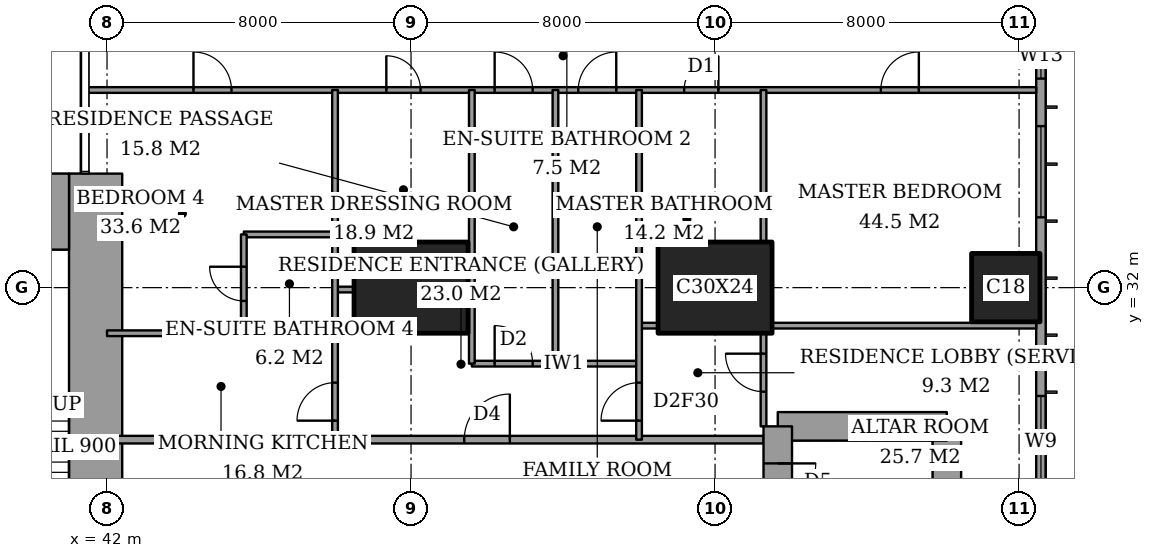
"""IFC4 building model, lengths in metres.
Left out: names, types, materials, properties, quantities, classifications, styles, units other than length and angle.
Written with IfcOpenShell. Run it as: python <this file> out.ifc"""

import sys

from ifc_helpers import new_model, si_unit, direction, frame, frame_2d, origin, origin_2d, place, context, subcontext, project, spatial, rectangle, extrude, element, fill, save


model = new_model("IFC4")
c1 = context("Model", 3, precision=1e-05, world=origin(), true_north=direction((0.0, 1.0)))
c2 = subcontext(c1, "Body", "Model", "MODEL_VIEW")
j1 = project(units=[si_unit("LENGTHUNIT", "METRE"), si_unit("PLANEANGLEUNIT", "RADIAN")], contexts=[c1])
p1 = place(None, origin())
s1 = spatial("IfcSite", under=j1, at=p1, CompositionType="ELEMENT")
p2 = place(p1, origin())
s2 = spatial("IfcBuilding", under=s1, at=p2, CompositionType="ELEMENT")
p3 = place(p2, frame((0.0, 0.0, 203.8)))
s3 = spatial("IfcBuildingStorey", under=s2, at=p3, CompositionType="ELEMENT", Elevation=203.8)
for number, where, z_axis, x_axis in (
    (1, (50.0, 32.0, 0.0), (0.0, 0.0, 1.0), (1.0, 0.0, 0.0)),
    (2, (58.0, 32.0, 0.0), (0.0, 0.0, 1.0), (1.0, 0.0, 0.0)),
):
    element("IfcColumn", number, at=place(p3, frame(where, z_axis=z_axis, x_axis=x_axis)), inside=s3, PredefinedType="COLUMN", context=c2, shape_type="SweptSolid", body=[
        extrude(rectangle(XDim=3.0, YDim=2.4, at=origin_2d()), origin(), (0.0, 0.0, 1.0), 3.6),
    ])
p4 = place(p3, frame((65.65, 32.0, 0.0), z_axis=(0.0, 0.0, 1.0), x_axis=(1.0, 0.0, 0.0)))
e3 = element("IfcColumn", 3, at=p4, inside=s3, PredefinedType="COLUMN", context=c2, shape_type="SweptSolid", body=[
    extrude(rectangle(XDim=1.8, YDim=1.8, at=origin_2d()), origin(), (0.0, 0.0, 1.0), 3.6),
])
p5 = place(p3, frame((37.85, 34.0, 0.0), z_axis=(0.0, 0.0, 1.0), x_axis=(1.0, 0.0, 0.0)))
e4 = element("IfcWall", 4, at=p5, inside=s3, PredefinedType="SHEAR", context=c2, shape_type="SweptSolid", body=[
    extrude(rectangle(XDim=3.15, YDim=2.0, at=frame_2d((1.575, 0.0))), origin(), (0.0, 0.0, 1.0), 3.6),
])
p6 = place(p3, frame((41.7, 24.85, 0.0), z_axis=(0.0, 0.0, 1.0), x_axis=(0.0, 1.0, 0.0)))
e5 = element("IfcWall", 5, at=p6, inside=s3, PredefinedType="SHEAR", context=c2, shape_type="SweptSolid", body=[
    extrude(rectangle(XDim=10.15, YDim=1.4, at=frame_2d((5.075, 0.0))), origin(), (0.0, 0.0, 1.0), 3.6),
])
p7 = place(p3, frame((64.1, 19.65, 0.0), z_axis=(0.0, 0.0, 1.0), x_axis=(0.0, 1.0, 0.0)))
e6 = element("IfcWall", 6, at=p7, inside=s3, PredefinedType="SHEAR", context=c2, shape_type="SweptSolid", body=[
    extrude(rectangle(XDim=8.7, YDim=0.75, at=frame_2d((4.35, 0.0))), origin(), (0.0, 0.0, 1.0), 3.6),
])
p8 = place(p3, frame((64.1, 28.35, 0.0), z_axis=(0.0, 0.0, 1.0), x_axis=(-1.0, 0.0, 0.0)))
e7 = element("IfcWall", 7, at=p8, inside=s3, PredefinedType="SHEAR", context=c2, shape_type="SweptSolid", body=[
    extrude(rectangle(XDim=4.45, YDim=0.75, at=frame_2d((2.225, 0.0))), origin(), (0.0, 0.0, 1.0), 3.6),
])
p9 = place(p3, frame((59.65, 28.35, 0.0), z_axis=(0.0, 0.0, 1.0), x_axis=(0.0, -1.0, 0.0)))
e8 = element("IfcWall", 8, at=p9, inside=s3, PredefinedType="SHEAR", context=c2, shape_type="SweptSolid", body=[
    extrude(rectangle(XDim=8.7, YDim=0.75, at=frame_2d((4.35, 0.0))), origin(), (0.0, 0.0, 1.0), 3.6),
])
p10 = place(p9, frame((0.975, 0.0, 0.0)))
e9 = element("IfcOpeningElement", 9, at=p10, cuts=e8, PredefinedType="OPENING", context=c2, shape_type="SweptSolid", body=[
    extrude(rectangle(XDim=1.0, YDim=2.1, at=frame_2d((0.5, 1.05))), frame((0.0, 0.385, 0.0), z_axis=(0.0, -1.0, 0.0), x_axis=(1.0, 0.0, 0.0)), (0.0, 0.0, 1.0), 0.77),
])
p11 = place(p3, frame((66.575, 3.175, 0.0), z_axis=(0.0, 0.0, 1.0), x_axis=(0.0, 1.0, 0.0)))
e10 = element("IfcWall", 10, at=p11, inside=s3, PredefinedType="SOLIDWALL", context=c2, shape_type="SweptSolid", body=[
    extrude(rectangle(XDim=41.65, YDim=0.25, at=frame_2d((20.825, 0.0))), origin(), (0.0, 0.0, 1.0), 3.6),
])
p12 = place(p11, frame((0.825, 0.0, 0.2)))
e11 = element("IfcOpeningElement", 11, at=p12, cuts=e10, PredefinedType="OPENING", context=c2, shape_type="SweptSolid", body=[
    extrude(rectangle(XDim=2.4, YDim=2.4, at=frame_2d((1.2, 1.2))), frame((0.0, 0.135, 0.0), z_axis=(0.0, -1.0, 0.0), x_axis=(1.0, 0.0, 0.0)), (0.0, 0.0, 1.0), 0.27),
])
p13 = place(p11, frame((6.6, 0.0, 0.2)))
e12 = element("IfcOpeningElement", 12, at=p13, cuts=e10, PredefinedType="OPENING", context=c2, shape_type="SweptSolid", body=[
    extrude(rectangle(XDim=1.2, YDim=2.4, at=frame_2d((0.6, 1.2))), frame((0.0, 0.135, 0.0), z_axis=(0.0, -1.0, 0.0), x_axis=(1.0, 0.0, 0.0)), (0.0, 0.0, 1.0), 0.27),
])
p14 = place(p11, frame((8.775, 0.0, 0.2)))
e13 = element("IfcOpeningElement", 13, at=p14, cuts=e10, PredefinedType="OPENING", context=c2, shape_type="SweptSolid", body=[
    extrude(rectangle(XDim=2.4, YDim=2.4, at=frame_2d((1.2, 1.2))), frame((0.0, 0.135, 0.0), z_axis=(0.0, -1.0, 0.0), x_axis=(1.0, 0.0, 0.0)), (0.0, 0.0, 1.0), 0.27),
])
p15 = place(p11, frame((15.675, 0.0, 0.2)))
e14 = element("IfcOpeningElement", 14, at=p15, cuts=e10, PredefinedType="OPENING", context=c2, shape_type="SweptSolid", body=[
    extrude(rectangle(XDim=2.4, YDim=2.4, at=frame_2d((1.2, 1.2))), frame((0.0, 0.135, 0.0), z_axis=(0.0, -1.0, 0.0), x_axis=(1.0, 0.0, 0.0)), (0.0, 0.0, 1.0), 0.27),
])
p16 = place(p11, frame((23.575, 0.0, 0.2)))
e15 = element("IfcOpeningElement", 15, at=p16, cuts=e10, PredefinedType="OPENING", context=c2, shape_type="SweptSolid", body=[
    extrude(rectangle(XDim=2.4, YDim=2.4, at=frame_2d((1.2, 1.2))), frame((0.0, 0.135, 0.0), z_axis=(0.0, -1.0, 0.0), x_axis=(1.0, 0.0, 0.0)), (0.0, 0.0, 1.0), 0.27),
])
p17 = place(p11, frame((30.675, 0.0, 0.2)))
e16 = element("IfcOpeningElement", 16, at=p17, cuts=e10, PredefinedType="OPENING", context=c2, shape_type="SweptSolid", body=[
    extrude(rectangle(XDim=2.4, YDim=2.4, at=frame_2d((1.2, 1.2))), frame((0.0, 0.135, 0.0), z_axis=(0.0, -1.0, 0.0), x_axis=(1.0, 0.0, 0.0)), (0.0, 0.0, 1.0), 0.27),
])
p18 = place(p11, frame((34.325, 0.0, 0.2)))
e17 = element("IfcOpeningElement", 17, at=p18, cuts=e10, PredefinedType="OPENING", context=c2, shape_type="SweptSolid", body=[
    extrude(rectangle(XDim=1.2, YDim=2.4, at=frame_2d((0.6, 1.2))), frame((0.0, 0.135, 0.0), z_axis=(0.0, -1.0, 0.0), x_axis=(1.0, 0.0, 0.0)), (0.0, 0.0, 1.0), 0.27),
])
p19 = place(p11, frame((38.425, 0.0, 0.2)))
e18 = element("IfcOpeningElement", 18, at=p19, cuts=e10, PredefinedType="OPENING", context=c2, shape_type="SweptSolid", body=[
    extrude(rectangle(XDim=2.4, YDim=2.4, at=frame_2d((1.2, 1.2))), frame((0.0, 0.135, 0.0), z_axis=(0.0, -1.0, 0.0), x_axis=(1.0, 0.0, 0.0)), (0.0, 0.0, 1.0), 0.27),
])
p20 = place(p3, frame((42.0, 28.0, 0.0), z_axis=(0.0, 0.0, 1.0), x_axis=(1.0, 0.0, 0.0)))
e19 = element("IfcWall", 19, at=p20, inside=s3, PredefinedType="PARTITIONING", context=c2, shape_type="SweptSolid", body=[
    extrude(rectangle(XDim=17.275, YDim=0.2, at=frame_2d((8.637, 0.0))), origin(), (0.0, 0.0, 1.0), 3.35),
])
p21 = place(p20, frame((9.4, 0.0, 0.0)))
e20 = element("IfcOpeningElement", 20, at=p21, cuts=e19, PredefinedType="OPENING", context=c2, shape_type="SweptSolid", body=[
    extrude(rectangle(XDim=1.2, YDim=2.4, at=frame_2d((0.6, 1.2))), frame((0.0, 0.11, 0.0), z_axis=(0.0, -1.0, 0.0), x_axis=(1.0, 0.0, 0.0)), (0.0, 0.0, 1.0), 0.22),
])
p22 = place(p3, frame((51.6, 30.0, 0.0), z_axis=(0.0, 0.0, 1.0), x_axis=(1.0, 0.0, 0.0)))
e21 = element("IfcWall", 21, at=p22, inside=s3, PredefinedType="PARTITIONING", context=c2, shape_type="SweptSolid", body=[
    extrude(rectangle(XDim=4.4, YDim=0.15, at=frame_2d((2.2, 0.0))), origin(), (0.0, 0.0, 1.0), 3.35),
])
p23 = place(p22, frame((0.6, 0.0, 0.0)))
e22 = element("IfcOpeningElement", 22, at=p23, cuts=e21, PredefinedType="OPENING", context=c2, shape_type="SweptSolid", body=[
    extrude(rectangle(XDim=1.0, YDim=2.1, at=frame_2d((0.5, 1.05))), frame((0.0, 0.085, 0.0), z_axis=(0.0, -1.0, 0.0), x_axis=(1.0, 0.0, 0.0)), (0.0, 0.0, 1.0), 0.17),
])
p24 = place(p3, frame((42.0, 30.8, 0.0), z_axis=(0.0, 0.0, 1.0), x_axis=(1.0, 0.0, 0.0)))
e23 = element("IfcWall", 23, at=p24, inside=s3, PredefinedType="PARTITIONING", context=c2, shape_type="SweptSolid", body=[
    extrude(rectangle(XDim=6.0, YDim=0.15, at=frame_2d((3.0, 0.0))), origin(), (0.0, 0.0, 1.0), 3.35),
])
p25 = place(p3, frame((56.0, 31.0, 0.0), z_axis=(0.0, 0.0, 1.0), x_axis=(1.0, 0.0, 0.0)))
e24 = element("IfcWall", 24, at=p25, inside=s3, PredefinedType="PARTITIONING", context=c2, shape_type="SweptSolid", body=[
    extrude(rectangle(XDim=0.5, YDim=0.15, at=frame_2d((0.25, 0.0))), origin(), (0.0, 0.0, 1.0), 3.35),
])
p26 = place(p3, frame((59.5, 31.0, 0.0), z_axis=(0.0, 0.0, 1.0), x_axis=(1.0, 0.0, 0.0)))
e25 = element("IfcWall", 25, at=p26, inside=s3, PredefinedType="PARTITIONING", context=c2, shape_type="SweptSolid", body=[
    extrude(rectangle(XDim=6.95, YDim=0.15, at=frame_2d((3.475, 0.0))), origin(), (0.0, 0.0, 1.0), 3.35),
])
p27 = place(p3, frame((48.0, 31.95, 0.0), z_axis=(0.0, 0.0, 1.0), x_axis=(1.0, 0.0, 0.0)))
e26 = element("IfcWall", 26, at=p27, inside=s3, PredefinedType="PARTITIONING", context=c2, shape_type="SweptSolid", body=[
    extrude(rectangle(XDim=0.5, YDim=0.15, at=frame_2d((0.25, 0.0))), origin(), (0.0, 0.0, 1.0), 2.634),
])
p28 = place(p3, frame((45.6, 33.4, 0.0), z_axis=(0.0, 0.0, 1.0), x_axis=(1.0, 0.0, 0.0)))
e27 = element("IfcWall", 27, at=p28, inside=s3, PredefinedType="PARTITIONING", context=c2, shape_type="SweptSolid", body=[
    extrude(rectangle(XDim=2.4, YDim=0.15, at=frame_2d((1.2, 0.0))), origin(), (0.0, 0.0, 1.0), 3.35),
])
p29 = place(p3, frame((41.439, 37.2, 0.0), z_axis=(0.0, 0.0, 1.0), x_axis=(1.0, 0.0, 0.0)))
e28 = element("IfcWall", 28, at=p29, inside=s3, PredefinedType="PARTITIONING", context=c2, shape_type="SweptSolid", body=[
    extrude(rectangle(XDim=25.011, YDim=0.15, at=frame_2d((12.505, 0.0))), origin(), (0.0, 0.0, 1.0), 3.35),
])
p30 = place(p29, frame((10.761, 0.0, 0.0)))
e29 = element("IfcOpeningElement", 29, at=p30, cuts=e28, PredefinedType="OPENING", context=c2, shape_type="SweptSolid", body=[
    extrude(rectangle(XDim=1.0, YDim=2.1, at=frame_2d((0.5, 1.05))), frame((0.0, 0.085, 0.0), z_axis=(0.0, -1.0, 0.0), x_axis=(1.0, 0.0, 0.0)), (0.0, 0.0, 1.0), 0.17),
])
p31 = place(p29, frame((20.924, 0.0, 0.0)))
e30 = element("IfcOpeningElement", 30, at=p31, cuts=e28, PredefinedType="OPENING", context=c2, shape_type="SweptSolid", body=[
    extrude(rectangle(XDim=1.0, YDim=2.1, at=frame_2d((0.5, 1.05))), frame((0.0, 0.085, 0.0), z_axis=(0.0, -1.0, 0.0), x_axis=(1.0, 0.0, 0.0)), (0.0, 0.0, 1.0), 0.17),
])
p32 = place(p29, frame((15.749, 0.0, 0.0)))
e31 = element("IfcOpeningElement", 31, at=p32, cuts=e28, PredefinedType="OPENING", context=c2, shape_type="SweptSolid", body=[
    extrude(rectangle(XDim=0.9, YDim=2.1, at=frame_2d((0.45, 1.05))), frame((0.0, 0.085, 0.0), z_axis=(0.0, -1.0, 0.0), x_axis=(1.0, 0.0, 0.0)), (0.0, 0.0, 1.0), 0.17),
])
p33 = place(p29, frame((12.961, 0.0, 0.0)))
e32 = element("IfcOpeningElement", 32, at=p33, cuts=e28, PredefinedType="OPENING", context=c2, shape_type="SweptSolid", body=[
    extrude(rectangle(XDim=1.0, YDim=2.1, at=frame_2d((0.5, 1.05))), frame((0.0, 0.085, 0.0), z_axis=(0.0, -1.0, 0.0), x_axis=(1.0, 0.0, 0.0)), (0.0, 0.0, 1.0), 0.17),
])
p34 = place(p29, frame((7.911, 0.0, 0.0)))
e33 = element("IfcOpeningElement", 33, at=p34, cuts=e28, PredefinedType="OPENING", context=c2, shape_type="SweptSolid", body=[
    extrude(rectangle(XDim=0.9, YDim=2.1, at=frame_2d((0.45, 1.05))), frame((0.0, 0.085, 0.0), z_axis=(0.0, -1.0, 0.0), x_axis=(1.0, 0.0, 0.0)), (0.0, 0.0, 1.0), 0.17),
])
p35 = place(p29, frame((2.836, 0.0, 0.0)))
e34 = element("IfcOpeningElement", 34, at=p35, cuts=e28, PredefinedType="OPENING", context=c2, shape_type="SweptSolid", body=[
    extrude(rectangle(XDim=1.0, YDim=2.1, at=frame_2d((0.5, 1.05))), frame((0.0, 0.085, 0.0), z_axis=(0.0, -1.0, 0.0), x_axis=(1.0, 0.0, 0.0)), (0.0, 0.0, 1.0), 0.17),
])
p36 = place(p3, frame((45.6, 30.8, 0.0), z_axis=(0.0, 0.0, 1.0), x_axis=(0.0, 1.0, 0.0)))
e35 = element("IfcWall", 35, at=p36, inside=s3, PredefinedType="PARTITIONING", context=c2, shape_type="SweptSolid", body=[
    extrude(rectangle(XDim=2.6, YDim=0.15, at=frame_2d((1.3, 0.0))), origin(), (0.0, 0.0, 1.0), 3.35),
])
p37 = place(p36, frame((0.85, 0.0, 0.0)))
e36 = element("IfcOpeningElement", 36, at=p37, cuts=e35, PredefinedType="OPENING", context=c2, shape_type="SweptSolid", body=[
    extrude(rectangle(XDim=0.9, YDim=2.1, at=frame_2d((0.45, 1.05))), frame((0.0, 0.085, 0.0), z_axis=(0.0, -1.0, 0.0), x_axis=(1.0, 0.0, 0.0)), (0.0, 0.0, 1.0), 0.17),
])
p38 = place(p3, frame((48.0, 28.0, 0.0), z_axis=(0.0, 0.0, 1.0), x_axis=(0.0, 1.0, 0.0)))
e37 = element("IfcWall", 37, at=p38, inside=s3, PredefinedType="PARTITIONING", context=c2, shape_type="SweptSolid", body=[
    extrude(rectangle(XDim=9.2, YDim=0.15, at=frame_2d((4.6, 0.0))), origin(), (0.0, 0.0, 1.0), 3.35),
])
p39 = place(p38, frame((0.5, 0.0, 0.0)))
e38 = element("IfcOpeningElement", 38, at=p39, cuts=e37, PredefinedType="OPENING", context=c2, shape_type="SweptSolid", body=[
    extrude(rectangle(XDim=1.0, YDim=2.1, at=frame_2d((0.5, 1.05))), frame((0.0, 0.085, 0.0), z_axis=(0.0, -1.0, 0.0), x_axis=(1.0, 0.0, 0.0)), (0.0, 0.0, 1.0), 0.17),
])
for number, where, z_axis, x_axis in (
    (39, (51.6, 30.0, 0.0), (0.0, 0.0, 1.0), (0.0, 1.0, 0.0)),
    (40, (53.8, 30.0, 0.0), (0.0, 0.0, 1.0), (0.0, 1.0, 0.0)),
):
    element("IfcWall", number, at=place(p3, frame(where, z_axis=z_axis, x_axis=x_axis)), inside=s3, PredefinedType="PARTITIONING", context=c2, shape_type="SweptSolid", body=[
        extrude(rectangle(XDim=7.2, YDim=0.15, at=frame_2d((3.6, 0.0))), origin(), (0.0, 0.0, 1.0), 3.35),
    ])
p40 = place(p3, frame((56.0, 28.0, 0.0), z_axis=(0.0, 0.0, 1.0), x_axis=(0.0, 1.0, 0.0)))
e41 = element("IfcWall", 41, at=p40, inside=s3, PredefinedType="PARTITIONING", context=c2, shape_type="SweptSolid", body=[
    extrude(rectangle(XDim=9.2, YDim=0.15, at=frame_2d((4.6, 0.0))), origin(), (0.0, 0.0, 1.0), 3.35),
])
p41 = place(p40, frame((0.5, 0.0, 0.0)))
e42 = element("IfcOpeningElement", 42, at=p41, cuts=e41, PredefinedType="OPENING", context=c2, shape_type="SweptSolid", body=[
    extrude(rectangle(XDim=1.0, YDim=2.1, at=frame_2d((0.5, 1.05))), frame((0.0, 0.085, 0.0), z_axis=(0.0, -1.0, 0.0), x_axis=(1.0, 0.0, 0.0)), (0.0, 0.0, 1.0), 0.17),
])
p42 = place(p3, frame((59.275, 28.35, 0.0), z_axis=(0.0, 0.0, 1.0), x_axis=(0.0, 1.0, 0.0)))
e43 = element("IfcWall", 43, at=p42, inside=s3, PredefinedType="PARTITIONING", context=c2, shape_type="SweptSolid", body=[
    extrude(rectangle(XDim=2.45, YDim=0.15, at=frame_2d((1.225, 0.0))), origin(), (0.0, 0.0, 1.0), 3.35),
])
p43 = place(p42, frame((0.913, 0.0, 0.0)))
e44 = element("IfcOpeningElement", 44, at=p43, cuts=e43, PredefinedType="OPENING", context=c2, shape_type="SweptSolid", body=[
    extrude(rectangle(XDim=1.0, YDim=2.1, at=frame_2d((0.5, 1.05))), frame((0.0, 0.085, 0.0), z_axis=(0.0, -1.0, 0.0), x_axis=(1.0, 0.0, 0.0)), (0.0, 0.0, 1.0), 0.17),
])
p44 = place(p3, frame((59.275, 33.2, 0.0), z_axis=(0.0, 0.0, 1.0), x_axis=(0.0, 1.0, 0.0)))
e45 = element("IfcWall", 45, at=p44, inside=s3, PredefinedType="PARTITIONING", context=c2, shape_type="SweptSolid", body=[
    extrude(rectangle(XDim=4.0, YDim=0.15, at=frame_2d((2.0, 0.0))), origin(), (0.0, 0.0, 1.0), 3.35),
])
p45 = place(p16, origin())
e46 = element("IfcWindow", 46, at=p45, inside=s3, PartitioningType="SINGLE_PANEL", PredefinedType="WINDOW", context=c2, shape_type="SweptSolid", body=[
    extrude(rectangle(XDim=2.4, YDim=2.4, at=frame_2d((1.2, 1.2))), frame((0.0, 0.03, 0.0), z_axis=(0.0, -1.0, 0.0), x_axis=(1.0, 0.0, 0.0)), (0.0, 0.0, 1.0), 0.06),
])
fill(e15, e46)
p46 = place(p17, origin())
e47 = element("IfcWindow", 47, at=p46, inside=s3, PartitioningType="SINGLE_PANEL", PredefinedType="WINDOW", context=c2, shape_type="SweptSolid", body=[
    extrude(rectangle(XDim=2.4, YDim=2.4, at=frame_2d((1.2, 1.2))), frame((0.0, 0.03, 0.0), z_axis=(0.0, -1.0, 0.0), x_axis=(1.0, 0.0, 0.0)), (0.0, 0.0, 1.0), 0.06),
])
fill(e16, e47)
p47 = place(p18, origin())
e48 = element("IfcWindow", 48, at=p47, inside=s3, PartitioningType="SINGLE_PANEL", PredefinedType="WINDOW", context=c2, shape_type="SweptSolid", body=[
    extrude(rectangle(XDim=1.2, YDim=2.4, at=frame_2d((0.6, 1.2))), frame((0.0, 0.03, 0.0), z_axis=(0.0, -1.0, 0.0), x_axis=(1.0, 0.0, 0.0)), (0.0, 0.0, 1.0), 0.06),
])
fill(e17, e48)
p48 = place(p30, origin())
e49 = element("IfcDoor", 49, at=p48, inside=s3, OperationType="SINGLE_SWING_RIGHT", PredefinedType="DOOR", context=c2, shape_type="SweptSolid", body=[
    extrude(rectangle(XDim=1.0, YDim=2.1, at=frame_2d((0.5, 1.05))), frame((0.0, 0.025, 0.0), z_axis=(0.0, -1.0, 0.0), x_axis=(1.0, 0.0, 0.0)), (0.0, 0.0, 1.0), 0.05),
])
fill(e29, e49)
p49 = place(p31, origin())
e50 = element("IfcDoor", 50, at=p49, inside=s3, OperationType="SINGLE_SWING_LEFT", PredefinedType="DOOR", context=c2, shape_type="SweptSolid", body=[
    extrude(rectangle(XDim=1.0, YDim=2.1, at=frame_2d((0.5, 1.05))), frame((0.0, 0.025, 0.0), z_axis=(0.0, -1.0, 0.0), x_axis=(1.0, 0.0, 0.0)), (0.0, 0.0, 1.0), 0.05),
])
fill(e30, e50)
p50 = place(p43, origin())
e51 = element("IfcDoor", 51, at=p50, inside=s3, OperationType="SINGLE_SWING_LEFT", PredefinedType="DOOR", context=c2, shape_type="SweptSolid", body=[
    extrude(rectangle(XDim=1.0, YDim=2.1, at=frame_2d((0.5, 1.05))), frame((0.0, 0.025, 0.0), z_axis=(0.0, -1.0, 0.0), x_axis=(1.0, 0.0, 0.0)), (0.0, 0.0, 1.0), 0.05),
])
fill(e44, e51)
p51 = place(p32, origin())
e52 = element("IfcDoor", 52, at=p51, inside=s3, OperationType="SINGLE_SWING_LEFT", PredefinedType="DOOR", context=c2, shape_type="SweptSolid", body=[
    extrude(rectangle(XDim=0.9, YDim=2.1, at=frame_2d((0.45, 1.05))), frame((0.0, 0.025, 0.0), z_axis=(0.0, -1.0, 0.0), x_axis=(1.0, 0.0, 0.0)), (0.0, 0.0, 1.0), 0.05),
])
fill(e31, e52)
p52 = place(p41, origin())
e53 = element("IfcDoor", 53, at=p52, inside=s3, OperationType="SINGLE_SWING_RIGHT", PredefinedType="DOOR", context=c2, shape_type="SweptSolid", body=[
    extrude(rectangle(XDim=1.0, YDim=2.1, at=frame_2d((0.5, 1.05))), frame((0.0, 0.025, 0.0), z_axis=(0.0, -1.0, 0.0), x_axis=(1.0, 0.0, 0.0)), (0.0, 0.0, 1.0), 0.05),
])
fill(e42, e53)
p53 = place(p21, origin())
e54 = element("IfcDoor", 54, at=p53, inside=s3, OperationType="SINGLE_SWING_LEFT", PredefinedType="DOOR", context=c2, shape_type="SweptSolid", body=[
    extrude(rectangle(XDim=1.2, YDim=2.4, at=frame_2d((0.6, 1.2))), frame((0.0, 0.025, 0.0), z_axis=(0.0, -1.0, 0.0), x_axis=(1.0, 0.0, 0.0)), (0.0, 0.0, 1.0), 0.05),
])
fill(e20, e54)
p54 = place(p33, origin())
e55 = element("IfcDoor", 55, at=p54, inside=s3, OperationType="SINGLE_SWING_LEFT", PredefinedType="DOOR", context=c2, shape_type="SweptSolid", body=[
    extrude(rectangle(XDim=1.0, YDim=2.1, at=frame_2d((0.5, 1.05))), frame((0.0, 0.025, 0.0), z_axis=(0.0, -1.0, 0.0), x_axis=(1.0, 0.0, 0.0)), (0.0, 0.0, 1.0), 0.05),
])
fill(e32, e55)
p55 = place(p23, origin())
e56 = element("IfcDoor", 56, at=p55, inside=s3, OperationType="SINGLE_SWING_RIGHT", PredefinedType="DOOR", context=c2, shape_type="SweptSolid", body=[
    extrude(rectangle(XDim=1.0, YDim=2.1, at=frame_2d((0.5, 1.05))), frame((0.0, 0.025, 0.0), z_axis=(0.0, -1.0, 0.0), x_axis=(1.0, 0.0, 0.0)), (0.0, 0.0, 1.0), 0.05),
])
fill(e22, e56)
p56 = place(p34, origin())
e57 = element("IfcDoor", 57, at=p56, inside=s3, OperationType="SINGLE_SWING_RIGHT", PredefinedType="DOOR", context=c2, shape_type="SweptSolid", body=[
    extrude(rectangle(XDim=0.9, YDim=2.1, at=frame_2d((0.45, 1.05))), frame((0.0, 0.025, 0.0), z_axis=(0.0, -1.0, 0.0), x_axis=(1.0, 0.0, 0.0)), (0.0, 0.0, 1.0), 0.05),
])
fill(e33, e57)
p57 = place(p37, origin())
e58 = element("IfcDoor", 58, at=p57, inside=s3, OperationType="SINGLE_SWING_LEFT", PredefinedType="DOOR", context=c2, shape_type="SweptSolid", body=[
    extrude(rectangle(XDim=0.9, YDim=2.1, at=frame_2d((0.45, 1.05))), frame((0.0, 0.025, 0.0), z_axis=(0.0, -1.0, 0.0), x_axis=(1.0, 0.0, 0.0)), (0.0, 0.0, 1.0), 0.05),
])
fill(e36, e58)
p58 = place(p35, origin())
e59 = element("IfcDoor", 59, at=p58, inside=s3, OperationType="SINGLE_SWING_RIGHT", PredefinedType="DOOR", context=c2, shape_type="SweptSolid", body=[
    extrude(rectangle(XDim=1.0, YDim=2.1, at=frame_2d((0.5, 1.05))), frame((0.0, 0.025, 0.0), z_axis=(0.0, -1.0, 0.0), x_axis=(1.0, 0.0, 0.0)), (0.0, 0.0, 1.0), 0.05),
])
fill(e34, e59)
p59 = place(p39, origin())
e60 = element("IfcDoor", 60, at=p59, inside=s3, OperationType="SINGLE_SWING_RIGHT", PredefinedType="DOOR", context=c2, shape_type="SweptSolid", body=[
    extrude(rectangle(XDim=1.0, YDim=2.1, at=frame_2d((0.5, 1.05))), frame((0.0, 0.025, 0.0), z_axis=(0.0, -1.0, 0.0), x_axis=(1.0, 0.0, 0.0)), (0.0, 0.0, 1.0), 0.05),
])
fill(e38, e60)
p60 = place(p10, origin())
e61 = element("IfcDoor", 61, at=p60, inside=s3, OperationType="SINGLE_SWING_RIGHT", PredefinedType="DOOR", context=c2, shape_type="SweptSolid", body=[
    extrude(rectangle(XDim=1.0, YDim=2.1, at=frame_2d((0.5, 1.05))), frame((0.0, 0.025, 0.0), z_axis=(0.0, -1.0, 0.0), x_axis=(1.0, 0.0, 0.0)), (0.0, 0.0, 1.0), 0.05),
])
fill(e9, e61)
save(model, sys.argv[1])
